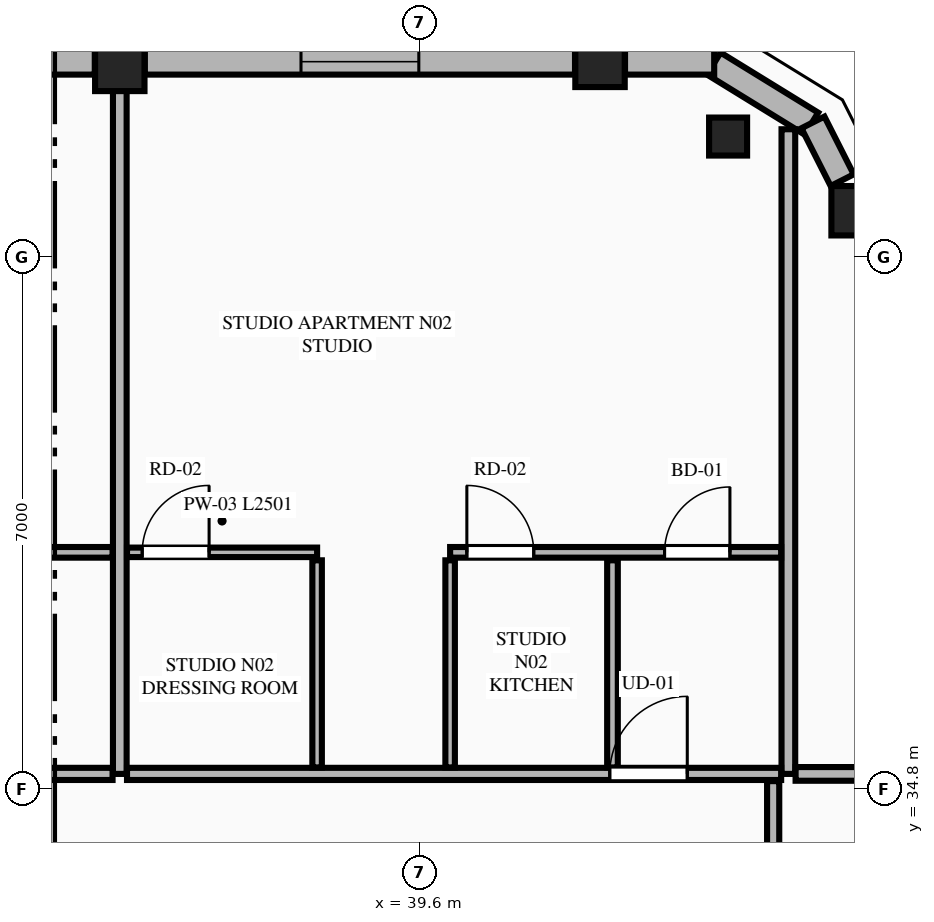
"""IFC4 building model, lengths in metres.
Left out: names, types, materials, properties, quantities, classifications, styles, units other than length and angle.
Written with IfcOpenShell. Run it as: python <this file> out.ifc"""

import sys

from ifc_helpers import new_model, si_unit, direction, frame, frame_2d, origin, origin_2d, place, context, subcontext, project, spatial, rectangle, extrude, element, fill, save


model = new_model("IFC4")
c1 = context("Model", 3, precision=1e-05, world=origin(), true_north=direction((0.0, 1.0)))
c2 = subcontext(c1, "Body", "Model", "MODEL_VIEW")
j1 = project(units=[si_unit("LENGTHUNIT", "METRE"), si_unit("PLANEANGLEUNIT", "RADIAN")], contexts=[c1])
p1 = place(None, origin())
s1 = spatial("IfcSite", under=j1, at=p1, CompositionType="ELEMENT")
p2 = place(p1, origin())
s2 = spatial("IfcBuilding", under=s1, at=p2, CompositionType="ELEMENT")
p3 = place(p2, frame((0.0, 0.0, 270.8)))
s3 = spatial("IfcBuildingStorey", under=s2, at=p3, CompositionType="ELEMENT", Elevation=270.8)
for number, where, z_axis, x_axis in (
    (1, (45.341, 42.409, 0.0), (0.0, 0.0, 1.0), (1.0, 0.0, 0.0)),
    (2, (41.972, 44.361, 0.0), (0.0, 0.0, 1.0), (1.0, 0.0, 0.0)),
    (3, (35.654, 44.308, 0.0), (0.0, 0.0, 1.0), (1.0, 0.0, 0.0)),
):
    element("IfcColumn", number, at=place(p3, frame(where, z_axis=z_axis, x_axis=x_axis)), inside=s3, PredefinedType="COLUMN", context=c2, shape_type="SweptSolid", body=[
        extrude(rectangle(XDim=0.65, YDim=0.65, at=origin_2d()), origin(), (0.0, 0.0, 1.0), 3.65),
    ])
p4 = place(p3, frame((43.657, 43.385, 0.0), z_axis=(0.0, 0.0, 1.0), x_axis=(-0.865256437757, 0.501329529272, 0.0)))
e4 = element("IfcColumn", 4, at=p4, inside=s3, PredefinedType="PILASTER", context=c2, shape_type="SweptSolid", body=[
    extrude(rectangle(XDim=0.5, YDim=0.35, at=origin_2d()), origin(), (0.0, 0.0, 1.0), 3.65),
])
p5 = place(p3, frame((44.753, 43.555, 0.0), z_axis=(0.0, 0.0, 1.0), x_axis=(-0.851680557619, 0.52406128246, 0.0)))
e5 = element("IfcWall", 5, at=p5, inside=s3, PredefinedType="STANDARD", context=c2, shape_type="SweptSolid", body=[
    extrude(rectangle(XDim=1.508, YDim=0.34, at=frame_2d((0.754, 0.0))), origin(), (0.0, 0.0, 1.0), 3.45),
])
p6 = place(p3, frame((45.158, 42.811, 0.0), z_axis=(0.0, 0.0, 1.0), x_axis=(-0.451907025977, 0.8920650424, 0.0)))
e6 = element("IfcWall", 6, at=p6, inside=s3, PredefinedType="STANDARD", context=c2, shape_type="SweptSolid", body=[
    extrude(rectangle(XDim=0.852, YDim=0.34, at=frame_2d((0.426, 0.0))), origin(), (0.0, 0.0, 1.0), 3.45),
])
p7 = place(p3, frame((43.474, 44.37, 0.0), z_axis=(0.0, 0.0, 1.0), x_axis=(-1.0, 0.0, 0.0)))
e7 = element("IfcWall", 7, at=p7, inside=s3, PredefinedType="STANDARD", context=c2, shape_type="SweptSolid", body=[
    extrude(rectangle(XDim=1.173, YDim=0.34, at=frame_2d((0.586, 0.0))), origin(), (0.0, 0.0, 1.0), 3.45),
])
p8 = place(p3, frame((41.643, 44.37, 0.0), z_axis=(0.0, 0.0, 1.0), x_axis=(-1.0, 0.0, 0.0)))
e8 = element("IfcWall", 8, at=p8, inside=s3, PredefinedType="STANDARD", context=c2, shape_type="SweptSolid", body=[
    extrude(rectangle(XDim=5.66, YDim=0.34, at=frame_2d((2.83, 0.0))), origin(), (0.0, 0.0, 1.0), 2.983),
])
p9 = place(p8, frame((2.055, 0.0, 0.75)))
e9 = element("IfcOpeningElement", 9, at=p9, cuts=e8, PredefinedType="OPENING", context=c2, shape_type="SweptSolid", body=[
    extrude(rectangle(XDim=1.55, YDim=2.05, at=frame_2d((0.775, 1.025))), frame((0.0, 0.18, 0.0), z_axis=(0.0, -1.0, 0.0), x_axis=(1.0, 0.0, 0.0)), (0.0, 0.0, 1.0), 0.36),
])
p10 = place(p3, frame((35.325, 44.37, 0.0), z_axis=(0.0, 0.0, 1.0), x_axis=(-1.0, 0.0, 0.0)))
e10 = element("IfcWall", 10, at=p10, inside=s3, PredefinedType="STANDARD", context=c2, shape_type="SweptSolid", body=[
    extrude(rectangle(XDim=5.85, YDim=0.34, at=frame_2d((2.925, 0.0))), origin(), (0.0, 0.0, 1.0), 2.983),
])
p11 = place(p10, frame((2.375, 0.0, 0.0)))
e11 = element("IfcOpeningElement", 11, at=p11, cuts=e10, PredefinedType="OPENING", context=c2, shape_type="SweptSolid", body=[
    extrude(rectangle(XDim=1.1, YDim=2.25, at=frame_2d((0.55, 1.125))), frame((0.0, 0.18, 0.0), z_axis=(0.0, -1.0, 0.0), x_axis=(1.0, 0.0, 0.0)), (0.0, 0.0, 1.0), 0.36),
])
p12 = place(p3, frame((35.654, 35.0, 0.0), z_axis=(0.0, 0.0, 1.0), x_axis=(0.0, 1.0, 0.0)))
e12 = element("IfcWall", 12, at=p12, inside=s3, PredefinedType="PARTITIONING", context=c2, shape_type="SweptSolid", body=[
    extrude(rectangle(XDim=9.195, YDim=0.18, at=frame_2d((4.598, 0.0))), origin(), (0.0, 0.0, 1.0), 2.907),
])
p13 = place(p3, frame((44.45, 35.0, 0.0), z_axis=(0.0, 0.0, 1.0), x_axis=(0.0, 1.0, 0.0)))
e13 = element("IfcWall", 13, at=p13, inside=s3, PredefinedType="PARTITIONING", context=c2, shape_type="SweptSolid", body=[
    extrude(rectangle(XDim=8.481, YDim=0.18, at=frame_2d((4.24, 0.0))), origin(), (0.0, 0.0, 1.0), 3.45),
])
p14 = place(p3, frame((20.445, 35.0, 0.0), z_axis=(0.0, 0.0, 1.0), x_axis=(1.0, 0.0, 0.0)))
e14 = element("IfcWall", 14, at=p14, inside=s3, PredefinedType="PARTITIONING", context=c2, shape_type="SweptSolid", body=[
    extrude(rectangle(XDim=15.114, YDim=0.16, at=frame_2d((7.557, 0.0))), origin(), (0.0, 0.0, 1.0), 3.45),
])
p15 = place(p14, frame((0.405, 0.0, 0.0)))
e15 = element("IfcOpeningElement", 15, at=p15, cuts=e14, PredefinedType="OPENING", context=c2, shape_type="SweptSolid", body=[
    extrude(rectangle(XDim=1.02, YDim=2.25, at=frame_2d((0.51, 1.125))), frame((0.0, 0.09, 0.0), z_axis=(0.0, -1.0, 0.0), x_axis=(1.0, 0.0, 0.0)), (0.0, 0.0, 1.0), 0.18),
])
p16 = place(p3, frame((29.301, 37.915, 0.0), z_axis=(0.0, 0.0, 1.0), x_axis=(1.0, 0.0, 0.0)))
e16 = element("IfcWall", 16, at=p16, inside=s3, PredefinedType="PLUMBINGWALL", context=c2, shape_type="SweptSolid", body=[
    extrude(rectangle(XDim=6.258, YDim=0.14, at=frame_2d((3.129, 0.0))), origin(), (0.0, 0.0, 1.0), 3.45),
])
p17 = place(p16, frame((2.704, 0.0, 0.0)))
e17 = element("IfcOpeningElement", 17, at=p17, cuts=e16, PredefinedType="OPENING", context=c2, shape_type="SweptSolid", body=[
    extrude(rectangle(XDim=0.86, YDim=2.1, at=frame_2d((0.43, 1.05))), frame((0.0, 0.08, 0.0), z_axis=(0.0, -1.0, 0.0), x_axis=(1.0, 0.0, 0.0)), (0.0, 0.0, 1.0), 0.16),
])
p18 = place(p3, frame((35.749, 35.0, 0.0), z_axis=(0.0, 0.0, 1.0), x_axis=(1.0, 0.0, 0.0)))
e18 = element("IfcWall", 18, at=p18, inside=s3, PredefinedType="PARTITIONING", context=c2, shape_type="SweptSolid", body=[
    extrude(rectangle(XDim=8.606, YDim=0.16, at=frame_2d((4.303, 0.0))), origin(), (0.0, 0.0, 1.0), 3.45),
])
p19 = place(p18, frame((6.351, 0.0, 0.0)))
e19 = element("IfcOpeningElement", 19, at=p19, cuts=e18, PredefinedType="OPENING", context=c2, shape_type="SweptSolid", body=[
    extrude(rectangle(XDim=1.02, YDim=2.25, at=frame_2d((0.51, 1.125))), frame((0.0, 0.09, 0.0), z_axis=(0.0, -1.0, 0.0), x_axis=(1.0, 0.0, 0.0)), (0.0, 0.0, 1.0), 0.18),
])
p20 = place(p3, frame((40.0, 35.085, 0.0), z_axis=(0.0, 0.0, 1.0), x_axis=(0.0, 1.0, 0.0)))
e20 = element("IfcWall", 20, at=p20, inside=s3, PredefinedType="PARTITIONING", context=c2, shape_type="SweptSolid", body=[
    extrude(rectangle(XDim=2.725, YDim=0.125, at=frame_2d((1.363, 0.0))), origin(), (0.0, 0.0, 1.0), 3.45),
])
p21 = place(p3, frame((40.0, 37.915, 0.0), z_axis=(0.0, 0.0, 1.0), x_axis=(1.0, 0.0, 0.0)))
e21 = element("IfcWall", 21, at=p21, inside=s3, PredefinedType="PLUMBINGWALL", context=c2, shape_type="SweptSolid", body=[
    extrude(rectangle(XDim=4.355, YDim=0.14, at=frame_2d((2.177, 0.0))), origin(), (0.0, 0.0, 1.0), 3.45),
])
p22 = place(p21, frame((2.821, 0.0, 0.0)))
e22 = element("IfcOpeningElement", 22, at=p22, cuts=e21, PredefinedType="OPENING", context=c2, shape_type="SweptSolid", body=[
    extrude(rectangle(XDim=0.86, YDim=2.1, at=frame_2d((0.43, 1.05))), frame((0.0, 0.08, 0.0), z_axis=(0.0, -1.0, 0.0), x_axis=(1.0, 0.0, 0.0)), (0.0, 0.0, 1.0), 0.16),
])
p23 = place(p21, frame((0.22, 0.0, 0.0)))
e23 = element("IfcOpeningElement", 23, at=p23, cuts=e21, PredefinedType="OPENING", context=c2, shape_type="SweptSolid", body=[
    extrude(rectangle(XDim=0.88, YDim=2.15, at=frame_2d((0.44, 1.075))), frame((0.0, 0.08, 0.0), z_axis=(0.0, -1.0, 0.0), x_axis=(1.0, 0.0, 0.0)), (0.0, 0.0, 1.0), 0.16),
])
p24 = place(p3, frame((42.136, 35.085, 0.0), z_axis=(0.0, 0.0, 1.0), x_axis=(0.0, 1.0, 0.0)))
e24 = element("IfcWall", 24, at=p24, inside=s3, PredefinedType="PLUMBINGWALL", context=c2, shape_type="SweptSolid", body=[
    extrude(rectangle(XDim=2.725, YDim=0.14, at=frame_2d((1.363, 0.0))), origin(), (0.0, 0.0, 1.0), 3.45),
])
p25 = place(p3, frame((38.25, 35.085, 0.0), z_axis=(0.0, 0.0, 1.0), x_axis=(0.0, 1.0, 0.0)))
e25 = element("IfcWall", 25, at=p25, inside=s3, PredefinedType="PARTITIONING", context=c2, shape_type="SweptSolid", body=[
    extrude(rectangle(XDim=2.725, YDim=0.125, at=frame_2d((1.363, 0.0))), origin(), (0.0, 0.0, 1.0), 3.45),
])
p26 = place(p3, frame((35.749, 37.915, 0.0), z_axis=(0.0, 0.0, 1.0), x_axis=(1.0, 0.0, 0.0)))
e26 = element("IfcWall", 26, at=p26, inside=s3, PredefinedType="PARTITIONING", context=c2, shape_type="SweptSolid", body=[
    extrude(rectangle(XDim=2.501, YDim=0.125, at=frame_2d((1.25, 0.0))), origin(), (0.0, 0.0, 1.0), 3.45),
])
p27 = place(p26, frame((0.2, 0.0, 0.0)))
e27 = element("IfcOpeningElement", 27, at=p27, cuts=e26, PredefinedType="OPENING", context=c2, shape_type="SweptSolid", body=[
    extrude(rectangle(XDim=0.88, YDim=2.15, at=frame_2d((0.44, 1.075))), frame((0.0, 0.073, 0.0), z_axis=(0.0, -1.0, 0.0), x_axis=(1.0, 0.0, 0.0)), (0.0, 0.0, 1.0), 0.145),
])
p28 = place(p3, frame((44.545, 35.0, 0.0), z_axis=(0.0, 0.0, 1.0), x_axis=(1.0, 0.0, 0.0)))
e28 = element("IfcWall", 28, at=p28, inside=s3, PredefinedType="PARTITIONING", context=c2, shape_type="SweptSolid", body=[
    extrude(rectangle(XDim=4.322, YDim=0.18, at=frame_2d((2.161, 0.0))), origin(), (0.0, 0.0, 1.0), 3.45),
])
p29 = place(p3, frame((44.25, 16.495, 0.0), z_axis=(0.0, 0.0, 1.0), x_axis=(0.0, 1.0, 0.0)))
e29 = element("IfcWall", 29, at=p29, inside=s3, PredefinedType="PARTITIONING", context=c2, shape_type="SweptSolid", body=[
    extrude(rectangle(XDim=18.41, YDim=0.16, at=frame_2d((9.205, 0.0))), origin(), (0.0, 0.0, 1.0), 3.137),
])
p30 = place(p29, frame((0.4, 0.0, 0.0)))
e30 = element("IfcOpeningElement", 30, at=p30, cuts=e29, PredefinedType="OPENING", context=c2, shape_type="SweptSolid", body=[
    extrude(rectangle(XDim=1.02, YDim=2.25, at=frame_2d((0.51, 1.125))), frame((0.0, 0.09, 0.0), z_axis=(0.0, -1.0, 0.0), x_axis=(1.0, 0.0, 0.0)), (0.0, 0.0, 1.0), 0.18),
])
p31 = place(p9, origin())
e31 = element("IfcWindow", 31, at=p31, inside=s3, PartitioningType="SINGLE_PANEL", PredefinedType="WINDOW", context=c2, shape_type="SweptSolid", body=[
    extrude(rectangle(XDim=1.55, YDim=2.05, at=frame_2d((0.775, 1.025))), frame((0.0, 0.03, 0.0), z_axis=(0.0, -1.0, 0.0), x_axis=(1.0, 0.0, 0.0)), (0.0, 0.0, 1.0), 0.06),
])
fill(e9, e31)
p32 = place(p27, origin())
e32 = element("IfcDoor", 32, at=p32, inside=s3, OperationType="SINGLE_SWING_RIGHT", PredefinedType="DOOR", context=c2, shape_type="SweptSolid", body=[
    extrude(rectangle(XDim=0.88, YDim=2.15, at=frame_2d((0.44, 1.075))), frame((0.0, 0.025, 0.0), z_axis=(0.0, -1.0, 0.0), x_axis=(1.0, 0.0, 0.0)), (0.0, 0.0, 1.0), 0.05),
])
fill(e27, e32)
p33 = place(p22, origin())
e33 = element("IfcDoor", 33, at=p33, inside=s3, OperationType="SINGLE_SWING_RIGHT", PredefinedType="DOOR", context=c2, shape_type="SweptSolid", body=[
    extrude(rectangle(XDim=0.86, YDim=2.1, at=frame_2d((0.43, 1.05))), frame((0.0, 0.025, 0.0), z_axis=(0.0, -1.0, 0.0), x_axis=(1.0, 0.0, 0.0)), (0.0, 0.0, 1.0), 0.05),
])
fill(e22, e33)
p34 = place(p19, origin())
e34 = element("IfcDoor", 34, at=p34, inside=s3, OperationType="SINGLE_SWING_RIGHT", PredefinedType="DOOR", context=c2, shape_type="SweptSolid", body=[
    extrude(rectangle(XDim=1.02, YDim=2.25, at=frame_2d((0.51, 1.125))), frame((0.0, 0.025, 0.0), z_axis=(0.0, -1.0, 0.0), x_axis=(1.0, 0.0, 0.0)), (0.0, 0.0, 1.0), 0.05),
])
fill(e19, e34)
p35 = place(p23, origin())
e35 = element("IfcDoor", 35, at=p35, inside=s3, OperationType="SINGLE_SWING_LEFT", PredefinedType="DOOR", context=c2, shape_type="SweptSolid", body=[
    extrude(rectangle(XDim=0.88, YDim=2.15, at=frame_2d((0.44, 1.075))), frame((0.0, 0.025, 0.0), z_axis=(0.0, -1.0, 0.0), x_axis=(1.0, 0.0, 0.0)), (0.0, 0.0, 1.0), 0.05),
])
fill(e23, e35)
save(model, sys.argv[1])
